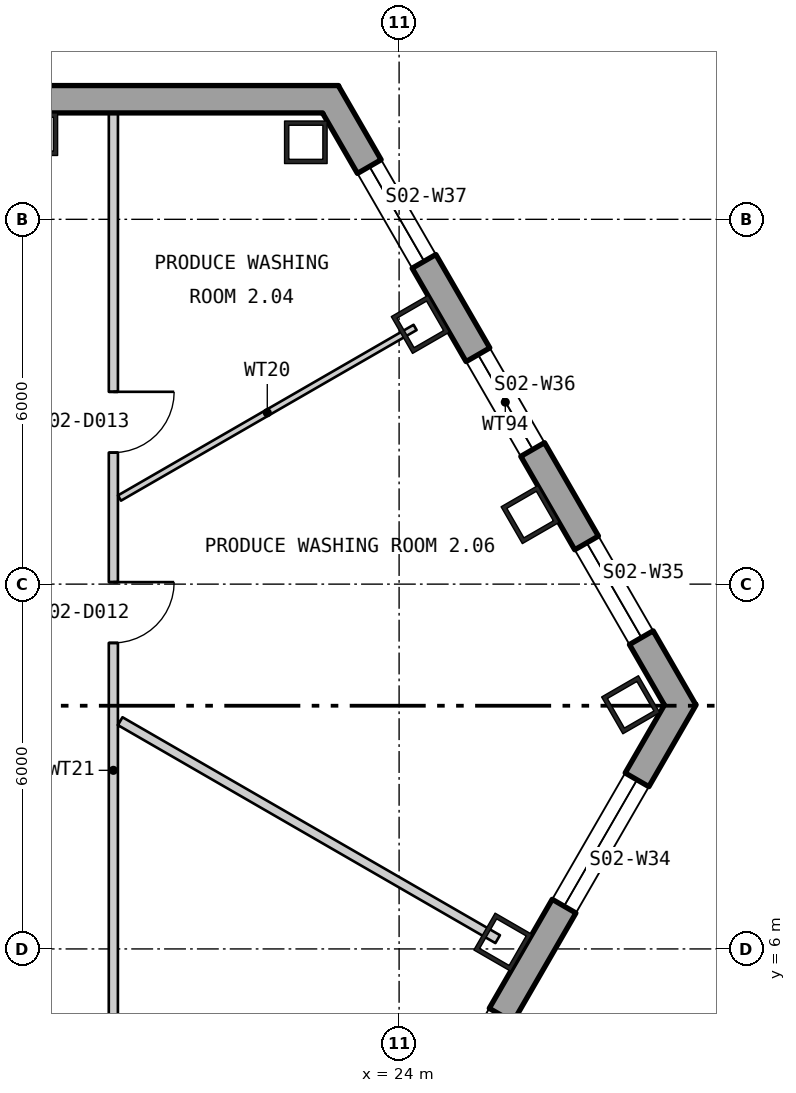
"""IFC4 building model, lengths in metres.
Left out: names, types, materials, properties, quantities, classifications, styles, units other than length and angle.
Written with IfcOpenShell. Run it as: python <this file> out.ifc"""

import sys

from ifc_helpers import new_model, si_unit, direction, frame, frame_2d, origin, origin_2d, place, context, subcontext, project, spatial, polyline, rectangle, hollow_rectangle, outline, extrude, element, fill, save


model = new_model("IFC4")
c1 = context("Model", 3, precision=1e-05, world=origin(), true_north=direction((0.0, 1.0)))
c2 = subcontext(c1, "Body", "Model", "MODEL_VIEW")
j1 = project(units=[si_unit("LENGTHUNIT", "METRE"), si_unit("PLANEANGLEUNIT", "RADIAN")], contexts=[c1])
p1 = place(None, origin())
s1 = spatial("IfcSite", under=j1, at=p1, CompositionType="ELEMENT")
p2 = place(p1, origin())
s2 = spatial("IfcBuilding", under=s1, at=p2, CompositionType="ELEMENT")
p3 = place(p2, frame((0.0, 0.0, 33.3)))
s3 = spatial("IfcBuildingStorey", under=s2, at=p3, CompositionType="ELEMENT", Elevation=33.3)
for number, where, z_axis, x_axis in (
    (1, (22.466, 19.267, 0.0), (0.0, 0.0, 1.0), (-1.0, 0.0, 0.0)),
    (2, (18.034, 19.4, 0.0), (0.0, 0.0, 1.0), (-1.0, 0.0, 0.0)),
    (3, (25.707, 6.111, 0.0), (0.0, 0.0, 1.0), (0.5, 0.866, 0.0)),
    (4, (27.808, 10.016, 0.0), (0.0, 0.0, 1.0), (-0.5, 0.866, 0.0)),
    (5, (26.155, 13.144, 0.0), (0.0, 0.0, 1.0), (-0.5, 0.866, 0.0)),
    (6, (24.349, 16.272, 0.0), (0.0, 0.0, 1.0), (-0.5, 0.866, 0.0)),
):
    element("IfcColumn", number, at=place(p3, frame(where, z_axis=z_axis, x_axis=x_axis)), inside=s3, PredefinedType="COLUMN", context=c2, shape_type="SweptSolid", body=[
        extrude(hollow_rectangle(XDim=0.7, YDim=0.7, WallThickness=0.07, at=origin_2d()), origin(), (0.0, 0.0, 1.0), 4.5),
    ])
p4 = place(p3, frame((22.875, 19.975, -0.4), z_axis=(0.0, 0.0, 1.0), x_axis=(-1.0, 0.0, 0.0)))
e7 = element("IfcWall", 7, at=p4, inside=s3, PredefinedType="SOLIDWALL", context=c2, shape_type="SweptSolid", body=[
    extrude(outline(polyline([(-0.13, -0.225), (45.88, -0.225), (45.62, 0.225), (0.13, 0.225), (-0.13, -0.225)])), origin(), (0.0, 0.0, 1.0), 4.5),
])
p5 = place(p4, frame((5.895, 0.0, 1.3)))
e8 = element("IfcOpeningElement", 8, at=p5, cuts=e7, PredefinedType="OPENING", context=c2, shape_type="SweptSolid", body=[
    extrude(rectangle(XDim=2.4, YDim=2.6, at=frame_2d((1.2, 1.3))), frame((0.0, 0.235, 0.0), z_axis=(0.0, -1.0, 0.0), x_axis=(1.0, 0.0, 0.0)), (0.0, 0.0, 1.0), 0.47),
])
p6 = place(p4, frame((10.403, 0.0, 1.3)))
e9 = element("IfcOpeningElement", 9, at=p6, cuts=e7, PredefinedType="OPENING", context=c2, shape_type="SweptSolid", body=[
    extrude(rectangle(XDim=2.4, YDim=2.6, at=frame_2d((1.2, 1.3))), frame((0.0, 0.235, 0.0), z_axis=(0.0, -1.0, 0.0), x_axis=(1.0, 0.0, 0.0)), (0.0, 0.0, 1.0), 0.47),
])
p7 = place(p4, frame((14.912, 0.0, 1.3)))
e10 = element("IfcOpeningElement", 10, at=p7, cuts=e7, PredefinedType="OPENING", context=c2, shape_type="SweptSolid", body=[
    extrude(rectangle(XDim=2.4, YDim=2.6, at=frame_2d((1.2, 1.3))), frame((0.0, 0.235, 0.0), z_axis=(0.0, -1.0, 0.0), x_axis=(1.0, 0.0, 0.0)), (0.0, 0.0, 1.0), 0.47),
])
p8 = place(p4, frame((19.421, 0.0, 1.3)))
e11 = element("IfcOpeningElement", 11, at=p8, cuts=e7, PredefinedType="OPENING", context=c2, shape_type="SweptSolid", body=[
    extrude(rectangle(XDim=2.4, YDim=2.6, at=frame_2d((1.2, 1.3))), frame((0.0, 0.235, 0.0), z_axis=(0.0, -1.0, 0.0), x_axis=(1.0, 0.0, 0.0)), (0.0, 0.0, 1.0), 0.47),
])
p9 = place(p4, frame((23.929, 0.0, 1.3)))
e12 = element("IfcOpeningElement", 12, at=p9, cuts=e7, PredefinedType="OPENING", context=c2, shape_type="SweptSolid", body=[
    extrude(rectangle(XDim=2.4, YDim=2.6, at=frame_2d((1.2, 1.3))), frame((0.0, 0.235, 0.0), z_axis=(0.0, -1.0, 0.0), x_axis=(1.0, 0.0, 0.0)), (0.0, 0.0, 1.0), 0.47),
])
p10 = place(p4, frame((28.438, 0.0, 1.3)))
e13 = element("IfcOpeningElement", 13, at=p10, cuts=e7, PredefinedType="OPENING", context=c2, shape_type="SweptSolid", body=[
    extrude(rectangle(XDim=2.4, YDim=2.6, at=frame_2d((1.2, 1.3))), frame((0.0, 0.235, 0.0), z_axis=(0.0, -1.0, 0.0), x_axis=(1.0, 0.0, 0.0)), (0.0, 0.0, 1.0), 0.47),
])
p11 = place(p4, frame((32.947, 0.0, 1.3)))
e14 = element("IfcOpeningElement", 14, at=p11, cuts=e7, PredefinedType="OPENING", context=c2, shape_type="SweptSolid", body=[
    extrude(rectangle(XDim=2.4, YDim=2.6, at=frame_2d((1.2, 1.3))), frame((0.0, 0.235, 0.0), z_axis=(0.0, -1.0, 0.0), x_axis=(1.0, 0.0, 0.0)), (0.0, 0.0, 1.0), 0.47),
])
p12 = place(p4, frame((37.455, 0.0, 1.3)))
e15 = element("IfcOpeningElement", 15, at=p12, cuts=e7, PredefinedType="OPENING", context=c2, shape_type="SweptSolid", body=[
    extrude(rectangle(XDim=2.4, YDim=2.6, at=frame_2d((1.2, 1.3))), frame((0.0, 0.235, 0.0), z_axis=(0.0, -1.0, 0.0), x_axis=(1.0, 0.0, 0.0)), (0.0, 0.0, 1.0), 0.47),
])
p13 = place(p3, frame((5.75, -29.605, -0.18), z_axis=(0.0, 0.0, 1.0), x_axis=(0.500000335318, 0.866025210188, 0.0)))
e16 = element("IfcWall", 16, at=p13, inside=s3, PredefinedType="SOLIDWALL", context=c2, shape_type="SweptSolid", body=[
    extrude(outline(polyline([(-0.13, -0.225), (45.88, -0.225), (45.62, 0.225), (0.13, 0.225), (-0.13, -0.225)])), origin(), (0.0, 0.0, 1.0), 4.28),
])
p14 = place(p13, frame((1.425, 0.0, 1.08)))
e17 = element("IfcOpeningElement", 17, at=p14, cuts=e16, PredefinedType="OPENING", context=c2, shape_type="SweptSolid", body=[
    extrude(rectangle(XDim=2.4, YDim=2.6, at=frame_2d((1.2, 1.3))), frame((0.0, 0.235, 0.0), z_axis=(0.0, -1.0, 0.0), x_axis=(1.0, 0.0, 0.0)), (0.0, 0.0, 1.0), 0.47),
])
p15 = place(p13, frame((5.895, 0.0, 1.08)))
e18 = element("IfcOpeningElement", 18, at=p15, cuts=e16, PredefinedType="OPENING", context=c2, shape_type="SweptSolid", body=[
    extrude(rectangle(XDim=2.4, YDim=2.6, at=frame_2d((1.2, 1.3))), frame((0.0, 0.235, 0.0), z_axis=(0.0, -1.0, 0.0), x_axis=(1.0, 0.0, 0.0)), (0.0, 0.0, 1.0), 0.47),
])
p16 = place(p13, frame((10.403, 0.0, 1.08)))
e19 = element("IfcOpeningElement", 19, at=p16, cuts=e16, PredefinedType="OPENING", context=c2, shape_type="SweptSolid", body=[
    extrude(rectangle(XDim=2.4, YDim=2.6, at=frame_2d((1.2, 1.3))), frame((0.0, 0.235, 0.0), z_axis=(0.0, -1.0, 0.0), x_axis=(1.0, 0.0, 0.0)), (0.0, 0.0, 1.0), 0.47),
])
p17 = place(p13, frame((14.912, 0.0, 1.08)))
e20 = element("IfcOpeningElement", 20, at=p17, cuts=e16, PredefinedType="OPENING", context=c2, shape_type="SweptSolid", body=[
    extrude(rectangle(XDim=2.4, YDim=2.6, at=frame_2d((1.2, 1.3))), frame((0.0, 0.235, 0.0), z_axis=(0.0, -1.0, 0.0), x_axis=(1.0, 0.0, 0.0)), (0.0, 0.0, 1.0), 0.47),
])
p18 = place(p13, frame((19.421, 0.0, 1.08)))
e21 = element("IfcOpeningElement", 21, at=p18, cuts=e16, PredefinedType="OPENING", context=c2, shape_type="SweptSolid", body=[
    extrude(rectangle(XDim=2.4, YDim=2.6, at=frame_2d((1.2, 1.3))), frame((0.0, 0.235, 0.0), z_axis=(0.0, -1.0, 0.0), x_axis=(1.0, 0.0, 0.0)), (0.0, 0.0, 1.0), 0.47),
])
p19 = place(p13, frame((23.929, 0.0, 1.08)))
e22 = element("IfcOpeningElement", 22, at=p19, cuts=e16, PredefinedType="OPENING", context=c2, shape_type="SweptSolid", body=[
    extrude(rectangle(XDim=2.4, YDim=2.6, at=frame_2d((1.2, 1.3))), frame((0.0, 0.235, 0.0), z_axis=(0.0, -1.0, 0.0), x_axis=(1.0, 0.0, 0.0)), (0.0, 0.0, 1.0), 0.47),
])
p20 = place(p13, frame((28.438, 0.0, 1.08)))
e23 = element("IfcOpeningElement", 23, at=p20, cuts=e16, PredefinedType="OPENING", context=c2, shape_type="SweptSolid", body=[
    extrude(rectangle(XDim=2.4, YDim=2.6, at=frame_2d((1.2, 1.3))), frame((0.0, 0.235, 0.0), z_axis=(0.0, -1.0, 0.0), x_axis=(1.0, 0.0, 0.0)), (0.0, 0.0, 1.0), 0.47),
])
p21 = place(p13, frame((32.947, 0.0, 1.08)))
e24 = element("IfcOpeningElement", 24, at=p21, cuts=e16, PredefinedType="OPENING", context=c2, shape_type="SweptSolid", body=[
    extrude(rectangle(XDim=2.4, YDim=2.6, at=frame_2d((1.2, 1.3))), frame((0.0, 0.235, 0.0), z_axis=(0.0, -1.0, 0.0), x_axis=(1.0, 0.0, 0.0)), (0.0, 0.0, 1.0), 0.47),
])
p22 = place(p13, frame((37.455, 0.0, 1.08)))
e25 = element("IfcOpeningElement", 25, at=p22, cuts=e16, PredefinedType="OPENING", context=c2, shape_type="SweptSolid", body=[
    extrude(rectangle(XDim=2.4, YDim=2.6, at=frame_2d((1.2, 1.3))), frame((0.0, 0.235, 0.0), z_axis=(0.0, -1.0, 0.0), x_axis=(1.0, 0.0, 0.0)), (0.0, 0.0, 1.0), 0.47),
])
p23 = place(p13, frame((41.925, 0.0, 1.08)))
e26 = element("IfcOpeningElement", 26, at=p23, cuts=e16, PredefinedType="OPENING", context=c2, shape_type="SweptSolid", body=[
    extrude(rectangle(XDim=2.4, YDim=2.6, at=frame_2d((1.2, 1.3))), frame((0.0, 0.235, 0.0), z_axis=(0.0, -1.0, 0.0), x_axis=(1.0, 0.0, 0.0)), (0.0, 0.0, 1.0), 0.47),
])
p24 = place(p3, frame((28.621, 10.013, -0.4), z_axis=(0.0, 0.0, 1.0), x_axis=(-0.500002460556, 0.866023983177, 0.0)))
e27 = element("IfcWall", 27, at=p24, inside=s3, PredefinedType="SOLIDWALL", context=c2, shape_type="SweptSolid", body=[
    extrude(outline(polyline([(-0.13, -0.225), (11.63, -0.225), (11.37, 0.225), (0.13, 0.225), (-0.13, -0.225)])), origin(), (0.0, 0.0, 1.0), 4.5),
])
p25 = place(p24, frame((1.276, 0.0, 1.3)))
e28 = element("IfcOpeningElement", 28, at=p25, cuts=e27, PredefinedType="OPENING", context=c2, shape_type="SweptSolid", body=[
    extrude(rectangle(XDim=1.8, YDim=2.6, at=frame_2d((0.9, 1.3))), frame((0.0, 0.235, 0.0), z_axis=(0.0, -1.0, 0.0), x_axis=(1.0, 0.0, 0.0)), (0.0, 0.0, 1.0), 0.47),
])
p26 = place(p24, frame((4.85, 0.0, 1.3)))
e29 = element("IfcOpeningElement", 29, at=p26, cuts=e27, PredefinedType="OPENING", context=c2, shape_type="SweptSolid", body=[
    extrude(rectangle(XDim=1.8, YDim=2.6, at=frame_2d((0.9, 1.3))), frame((0.0, 0.235, 0.0), z_axis=(0.0, -1.0, 0.0), x_axis=(1.0, 0.0, 0.0)), (0.0, 0.0, 1.0), 0.47),
])
p27 = place(p24, frame((8.424, 0.0, 1.3)))
e30 = element("IfcOpeningElement", 30, at=p27, cuts=e27, PredefinedType="OPENING", context=c2, shape_type="SweptSolid", body=[
    extrude(rectangle(XDim=1.8, YDim=2.6, at=frame_2d((0.9, 1.3))), frame((0.0, 0.235, 0.0), z_axis=(0.0, -1.0, 0.0), x_axis=(1.0, 0.0, 0.0)), (0.0, 0.0, 1.0), 0.47),
])
p28 = place(p3, frame((19.3, -1.875, 0.0), z_axis=(0.0, 0.0, 1.0), x_axis=(4.6242775e-05, 0.999999998931, 0.0)))
e31 = element("IfcWall", 31, at=p28, inside=s3, PredefinedType="PARTITIONING", context=c2, shape_type="SweptSolid", body=[
    extrude(rectangle(XDim=21.625, YDim=0.15, at=frame_2d((10.812, 0.0))), origin(), (0.0, 0.0, 1.0), 4.3),
])
p29 = place(p28, frame((12.908, 0.0, 0.0)))
e32 = element("IfcOpeningElement", 32, at=p29, cuts=e31, PredefinedType="OPENING", context=c2, shape_type="SweptSolid", body=[
    extrude(rectangle(XDim=1.0, YDim=2.1, at=frame_2d((0.5, 1.05))), frame((0.0, 0.085, 0.0), z_axis=(0.0, -1.0, 0.0), x_axis=(1.0, 0.0, 0.0)), (0.0, 0.0, 1.0), 0.17),
])
p30 = place(p28, frame((16.038, 0.0, 0.0)))
e33 = element("IfcOpeningElement", 33, at=p30, cuts=e31, PredefinedType="OPENING", context=c2, shape_type="SweptSolid", body=[
    extrude(rectangle(XDim=1.0, YDim=2.1, at=frame_2d((0.5, 1.05))), frame((0.0, 0.085, 0.0), z_axis=(0.0, -1.0, 0.0), x_axis=(1.0, 0.0, 0.0)), (0.0, 0.0, 1.0), 0.17),
])
p31 = place(p3, frame((19.401, 13.416, 0.0), z_axis=(0.0, 0.0, 1.0), x_axis=(0.866108468144, 0.499856100702, 0.0)))
e34 = element("IfcWall", 34, at=p31, inside=s3, PredefinedType="PARTITIONING", context=c2, shape_type="SweptSolid", body=[
    extrude(rectangle(XDim=5.614, YDim=0.1, at=frame_2d((2.807, 0.0))), origin(), (0.0, 0.0, 1.0), 4.3),
])
p32 = place(p3, frame((19.413, 9.746, 0.0), z_axis=(0.0, 0.0, 1.0), x_axis=(0.865976502062, -0.500084690704, 0.0)))
e35 = element("IfcWall", 35, at=p32, inside=s3, PredefinedType="PARTITIONING", context=c2, shape_type="SweptSolid", body=[
    extrude(rectangle(XDim=7.169, YDim=0.15, at=frame_2d((3.584, 0.0))), origin(), (0.0, 0.0, 1.0), 4.3),
])
p33 = place(p22, origin())
e36 = element("IfcWindow", 36, at=p33, inside=s3, PartitioningType="SINGLE_PANEL", PredefinedType="WINDOW", context=c2, shape_type="SweptSolid", body=[
    extrude(rectangle(XDim=2.4, YDim=2.6, at=frame_2d((1.2, 1.3))), frame((0.0, 0.105, 0.0), z_axis=(0.0, -1.0, 0.0), x_axis=(1.0, 0.0, 0.0)), (0.0, 0.0, 1.0), 0.06),
])
fill(e25, e36)
p34 = place(p23, origin())
e37 = element("IfcWindow", 37, at=p34, inside=s3, PartitioningType="SINGLE_PANEL", PredefinedType="WINDOW", context=c2, shape_type="SweptSolid", body=[
    extrude(rectangle(XDim=2.4, YDim=2.6, at=frame_2d((1.2, 1.3))), frame((0.0, 0.105, 0.0), z_axis=(0.0, -1.0, 0.0), x_axis=(1.0, 0.0, 0.0)), (0.0, 0.0, 1.0), 0.06),
])
fill(e26, e37)
p35 = place(p25, origin())
e38 = element("IfcWindow", 38, at=p35, inside=s3, PartitioningType="SINGLE_PANEL", PredefinedType="WINDOW", context=c2, shape_type="SweptSolid", body=[
    extrude(rectangle(XDim=1.8, YDim=2.6, at=frame_2d((0.9, 1.3))), frame((0.0, 0.105, 0.0), z_axis=(0.0, -1.0, 0.0), x_axis=(1.0, 0.0, 0.0)), (0.0, 0.0, 1.0), 0.06),
])
fill(e28, e38)
p36 = place(p26, origin())
e39 = element("IfcWindow", 39, at=p36, inside=s3, PartitioningType="SINGLE_PANEL", PredefinedType="WINDOW", context=c2, shape_type="SweptSolid", body=[
    extrude(rectangle(XDim=1.8, YDim=2.6, at=frame_2d((0.9, 1.3))), frame((0.0, 0.105, 0.0), z_axis=(0.0, -1.0, 0.0), x_axis=(1.0, 0.0, 0.0)), (0.0, 0.0, 1.0), 0.06),
])
fill(e29, e39)
p37 = place(p27, origin())
e40 = element("IfcWindow", 40, at=p37, inside=s3, PartitioningType="SINGLE_PANEL", PredefinedType="WINDOW", context=c2, shape_type="SweptSolid", body=[
    extrude(rectangle(XDim=1.8, YDim=2.6, at=frame_2d((0.9, 1.3))), frame((0.0, 0.105, 0.0), z_axis=(0.0, -1.0, 0.0), x_axis=(1.0, 0.0, 0.0)), (0.0, 0.0, 1.0), 0.06),
])
fill(e30, e40)
p38 = place(p29, origin())
e41 = element("IfcDoor", 41, at=p38, inside=s3, OperationType="SINGLE_SWING_RIGHT", PredefinedType="DOOR", context=c2, shape_type="SweptSolid", body=[
    extrude(rectangle(XDim=1.0, YDim=2.1, at=frame_2d((0.5, 1.05))), frame((0.0, 0.025, 0.0), z_axis=(0.0, -1.0, 0.0), x_axis=(1.0, 0.0, 0.0)), (0.0, 0.0, 1.0), 0.05),
])
fill(e32, e41)
p39 = place(p30, origin())
e42 = element("IfcDoor", 42, at=p39, inside=s3, OperationType="SINGLE_SWING_RIGHT", PredefinedType="DOOR", context=c2, shape_type="SweptSolid", body=[
    extrude(rectangle(XDim=1.0, YDim=2.1, at=frame_2d((0.5, 1.05))), frame((0.0, 0.025, 0.0), z_axis=(0.0, -1.0, 0.0), x_axis=(1.0, 0.0, 0.0)), (0.0, 0.0, 1.0), 0.05),
])
fill(e33, e42)
save(model, sys.argv[1])
